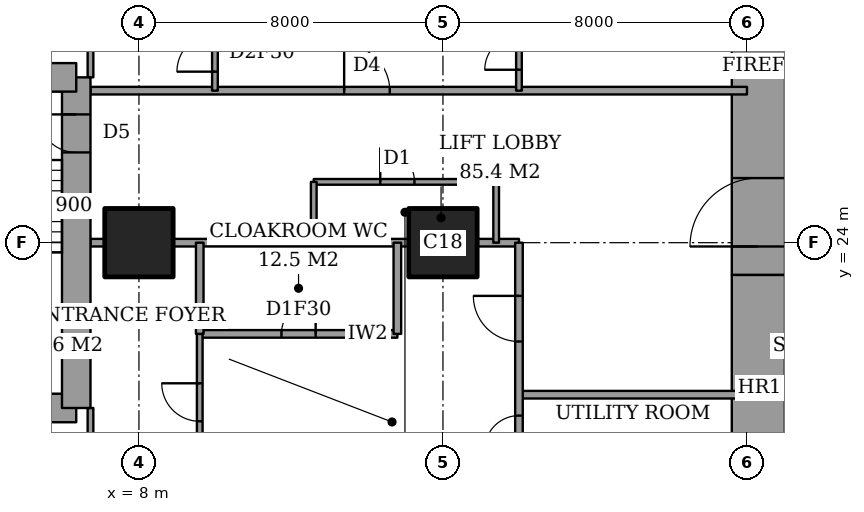
"""IFC4 building model, lengths in metres.
Left out: names, types, materials, properties, quantities, classifications, styles, units other than length and angle.
Written with IfcOpenShell. Run it as: python <this file> out.ifc"""

import sys

from ifc_helpers import new_model, si_unit, direction, frame, frame_2d, origin, origin_2d, place, context, subcontext, project, spatial, rectangle, extrude, element, fill, save


model = new_model("IFC4")
c1 = context("Model", 3, precision=1e-05, world=origin(), true_north=direction((0.0, 1.0)))
c2 = subcontext(c1, "Body", "Model", "MODEL_VIEW")
j1 = project(units=[si_unit("LENGTHUNIT", "METRE"), si_unit("PLANEANGLEUNIT", "RADIAN")], contexts=[c1])
p1 = place(None, origin())
s1 = spatial("IfcSite", under=j1, at=p1, CompositionType="ELEMENT")
p2 = place(p1, origin())
s2 = spatial("IfcBuilding", under=s1, at=p2, CompositionType="ELEMENT")
p3 = place(p2, frame((0.0, 0.0, 189.4)))
s3 = spatial("IfcBuildingStorey", under=s2, at=p3, CompositionType="ELEMENT", Elevation=189.4)
for number, where, z_axis, x_axis in (
    (1, (8.0, 24.0, 0.0), (0.0, 0.0, 1.0), (1.0, 0.0, 0.0)),
    (2, (16.0, 24.0, 0.0), (0.0, 0.0, 1.0), (1.0, 0.0, 0.0)),
):
    element("IfcColumn", number, at=place(p3, frame(where, z_axis=z_axis, x_axis=x_axis)), inside=s3, PredefinedType="COLUMN", context=c2, shape_type="SweptSolid", body=[
        extrude(rectangle(XDim=1.8, YDim=1.8, at=origin_2d()), origin(), (0.0, 0.0, 1.0), 3.6),
    ])
p4 = place(p3, frame((24.3, 13.0, 0.0), z_axis=(0.0, 0.0, 1.0), x_axis=(0.0, 1.0, 0.0)))
e3 = element("IfcWall", 3, at=p4, inside=s3, PredefinedType="SHEAR", context=c2, shape_type="SweptSolid", body=[
    extrude(rectangle(XDim=10.15, YDim=1.4, at=frame_2d((5.075, 0.0))), origin(), (0.0, 0.0, 1.0), 3.6),
])
p5 = place(p3, frame((24.3, 23.15, 0.0), z_axis=(0.0, 0.0, 1.0), x_axis=(0.0, 1.0, 0.0)))
e4 = element("IfcWall", 4, at=p5, inside=s3, PredefinedType="SHEAR", context=c2, shape_type="SweptSolid", body=[
    extrude(rectangle(XDim=11.85, YDim=1.4, at=frame_2d((5.925, 0.0))), origin(), (0.0, 0.0, 1.0), 3.6),
])
p6 = place(p5, frame((0.75, 0.0, 0.0)))
e5 = element("IfcOpeningElement", 5, at=p6, cuts=e4, PredefinedType="OPENING", context=c2, shape_type="SweptSolid", body=[
    extrude(rectangle(XDim=1.8, YDim=2.4, at=frame_2d((0.9, 1.2))), frame((0.0, 0.71, 0.0), z_axis=(0.0, -1.0, 0.0), x_axis=(1.0, 0.0, 0.0)), (0.0, 0.0, 1.0), 1.42),
])
p7 = place(p3, frame((1.9, 19.65, 0.0), z_axis=(0.0, 0.0, 1.0), x_axis=(1.0, 0.0, 0.0)))
e6 = element("IfcWall", 6, at=p7, inside=s3, PredefinedType="SHEAR", context=c2, shape_type="SweptSolid", body=[
    extrude(rectangle(XDim=4.45, YDim=0.75, at=frame_2d((2.225, 0.0))), origin(), (0.0, 0.0, 1.0), 3.6),
])
p8 = place(p3, frame((6.35, 19.65, 0.0), z_axis=(0.0, 0.0, 1.0), x_axis=(0.0, 1.0, 0.0)))
e7 = element("IfcWall", 7, at=p8, inside=s3, PredefinedType="SHEAR", context=c2, shape_type="SweptSolid", body=[
    extrude(rectangle(XDim=8.7, YDim=0.75, at=frame_2d((4.35, 0.0))), origin(), (0.0, 0.0, 1.0), 3.6),
])
p9 = place(p8, frame((6.725, 0.0, 0.0)))
e8 = element("IfcOpeningElement", 8, at=p9, cuts=e7, PredefinedType="OPENING", context=c2, shape_type="SweptSolid", body=[
    extrude(rectangle(XDim=1.0, YDim=2.1, at=frame_2d((0.5, 1.05))), frame((0.0, 0.385, 0.0), z_axis=(0.0, -1.0, 0.0), x_axis=(1.0, 0.0, 0.0)), (0.0, 0.0, 1.0), 0.77),
])
p10 = place(p3, frame((6.35, 28.35, 0.0), z_axis=(0.0, 0.0, 1.0), x_axis=(-1.0, 0.0, 0.0)))
e9 = element("IfcWall", 9, at=p10, inside=s3, PredefinedType="SHEAR", context=c2, shape_type="SweptSolid", body=[
    extrude(rectangle(XDim=4.45, YDim=0.75, at=frame_2d((2.225, 0.0))), origin(), (0.0, 0.0, 1.0), 3.6),
])
p11 = place(p3, frame((18.0, 20.0, 0.0), z_axis=(0.0, 0.0, 1.0), x_axis=(1.0, 0.0, 0.0)))
e10 = element("IfcWall", 10, at=p11, inside=s3, PredefinedType="PARTITIONING", context=c2, shape_type="SweptSolid", body=[
    extrude(rectangle(XDim=6.0, YDim=0.2, at=frame_2d((3.0, 0.0))), origin(), (0.0, 0.0, 1.0), 3.35),
])
p12 = place(p3, frame((9.6, 21.6, 0.0), z_axis=(0.0, 0.0, 1.0), x_axis=(1.0, 0.0, 0.0)))
e11 = element("IfcWall", 11, at=p12, inside=s3, PredefinedType="PARTITIONING", context=c2, shape_type="SweptSolid", body=[
    extrude(rectangle(XDim=5.2, YDim=0.2, at=frame_2d((2.6, 0.0))), origin(), (0.0, 0.0, 1.0), 3.35),
])
p13 = place(p12, frame((2.15, 0.0, 0.0)))
e12 = element("IfcOpeningElement", 12, at=p13, cuts=e11, PredefinedType="OPENING", context=c2, shape_type="SweptSolid", body=[
    extrude(rectangle(XDim=0.9, YDim=2.1, at=frame_2d((0.45, 1.05))), frame((0.0, 0.11, 0.0), z_axis=(0.0, -1.0, 0.0), x_axis=(1.0, 0.0, 0.0)), (0.0, 0.0, 1.0), 0.22),
])
p14 = place(p3, frame((6.725, 24.0, 0.0), z_axis=(0.0, 0.0, 1.0), x_axis=(1.0, 0.0, 0.0)))
e13 = element("IfcWall", 13, at=p14, inside=s3, PredefinedType="PARTITIONING", context=c2, shape_type="SweptSolid", body=[
    extrude(rectangle(XDim=0.375, YDim=0.2, at=frame_2d((0.188, 0.0))), origin(), (0.0, 0.0, 1.0), 3.35),
])
p15 = place(p3, frame((8.9, 24.0, 0.0), z_axis=(0.0, 0.0, 1.0), x_axis=(1.0, 0.0, 0.0)))
e14 = element("IfcWall", 14, at=p15, inside=s3, PredefinedType="PARTITIONING", context=c2, shape_type="SweptSolid", body=[
    extrude(rectangle(XDim=6.2, YDim=0.2, at=frame_2d((3.1, 0.0))), origin(), (0.0, 0.0, 1.0), 3.35),
])
p16 = place(p3, frame((16.9, 24.0, 0.0), z_axis=(0.0, 0.0, 1.0), x_axis=(1.0, 0.0, 0.0)))
e15 = element("IfcWall", 15, at=p16, inside=s3, PredefinedType="PARTITIONING", context=c2, shape_type="SweptSolid", body=[
    extrude(rectangle(XDim=1.1, YDim=0.2, at=frame_2d((0.55, 0.0))), origin(), (0.0, 0.0, 1.0), 3.35),
])
p17 = place(p3, frame((12.6, 25.6, 0.0), z_axis=(0.0, 0.0, 1.0), x_axis=(1.0, 0.0, 0.0)))
e16 = element("IfcWall", 16, at=p17, inside=s3, PredefinedType="PARTITIONING", context=c2, shape_type="SweptSolid", body=[
    extrude(rectangle(XDim=4.8, YDim=0.15, at=frame_2d((2.4, 0.0))), origin(), (0.0, 0.0, 1.0), 3.35),
])
p18 = place(p17, frame((1.75, 0.0, 0.0)))
e17 = element("IfcOpeningElement", 17, at=p18, cuts=e16, PredefinedType="OPENING", context=c2, shape_type="SweptSolid", body=[
    extrude(rectangle(XDim=0.9, YDim=2.1, at=frame_2d((0.45, 1.05))), frame((0.0, 0.085, 0.0), z_axis=(0.0, -1.0, 0.0), x_axis=(1.0, 0.0, 0.0)), (0.0, 0.0, 1.0), 0.17),
])
p19 = place(p3, frame((6.725, 28.0, 0.0), z_axis=(0.0, 0.0, 1.0), x_axis=(1.0, 0.0, 0.0)))
e18 = element("IfcWall", 18, at=p19, inside=s3, PredefinedType="PARTITIONING", context=c2, shape_type="SweptSolid", body=[
    extrude(rectangle(XDim=17.275, YDim=0.2, at=frame_2d((8.637, 0.0))), origin(), (0.0, 0.0, 1.0), 3.35),
])
p20 = place(p19, frame((6.675, 0.0, 0.0)))
e19 = element("IfcOpeningElement", 19, at=p20, cuts=e18, PredefinedType="OPENING", context=c2, shape_type="SweptSolid", body=[
    extrude(rectangle(XDim=1.2, YDim=2.4, at=frame_2d((0.6, 1.2))), frame((0.0, 0.11, 0.0), z_axis=(0.0, -1.0, 0.0), x_axis=(1.0, 0.0, 0.0)), (0.0, 0.0, 1.0), 0.22),
])
p21 = place(p3, frame((6.725, 17.2, 0.0), z_axis=(0.0, 0.0, 1.0), x_axis=(0.0, 1.0, 0.0)))
e20 = element("IfcWall", 20, at=p21, inside=s3, PredefinedType="PARTITIONING", context=c2, shape_type="SweptSolid", body=[
    extrude(rectangle(XDim=2.45, YDim=0.15, at=frame_2d((1.225, 0.0))), origin(), (0.0, 0.0, 1.0), 3.35),
])
p22 = place(p21, frame((0.587, 0.0, 0.0)))
e21 = element("IfcOpeningElement", 21, at=p22, cuts=e20, PredefinedType="OPENING", context=c2, shape_type="SweptSolid", body=[
    extrude(rectangle(XDim=0.9, YDim=2.1, at=frame_2d((0.45, 1.05))), frame((0.0, 0.085, 0.0), z_axis=(0.0, -1.0, 0.0), x_axis=(1.0, 0.0, 0.0)), (0.0, 0.0, 1.0), 0.17),
])
p23 = place(p3, frame((6.725, 28.35, 0.0), z_axis=(0.0, 0.0, 1.0), x_axis=(0.0, 1.0, 0.0)))
e22 = element("IfcWall", 22, at=p23, inside=s3, PredefinedType="PARTITIONING", context=c2, shape_type="SweptSolid", body=[
    extrude(rectangle(XDim=2.45, YDim=0.15, at=frame_2d((1.225, 0.0))), origin(), (0.0, 0.0, 1.0), 3.35),
])
p24 = place(p23, frame((0.913, 0.0, 0.0)))
e23 = element("IfcOpeningElement", 23, at=p24, cuts=e22, PredefinedType="OPENING", context=c2, shape_type="SweptSolid", body=[
    extrude(rectangle(XDim=1.0, YDim=2.1, at=frame_2d((0.5, 1.05))), frame((0.0, 0.085, 0.0), z_axis=(0.0, -1.0, 0.0), x_axis=(1.0, 0.0, 0.0)), (0.0, 0.0, 1.0), 0.17),
])
p25 = place(p3, frame((9.6, 21.6, 0.0), z_axis=(0.0, 0.0, 1.0), x_axis=(0.0, 1.0, 0.0)))
e24 = element("IfcWall", 24, at=p25, inside=s3, PredefinedType="PARTITIONING", context=c2, shape_type="SweptSolid", body=[
    extrude(rectangle(XDim=2.4, YDim=0.2, at=frame_2d((1.2, 0.0))), origin(), (0.0, 0.0, 1.0), 3.35),
])
p26 = place(p3, frame((9.6, 10.6, 0.0), z_axis=(0.0, 0.0, 1.0), x_axis=(0.0, 1.0, 0.0)))
e25 = element("IfcWall", 25, at=p26, inside=s3, PredefinedType="PARTITIONING", context=c2, shape_type="SweptSolid", body=[
    extrude(rectangle(XDim=11.0, YDim=0.15, at=frame_2d((5.5, 0.0))), origin(), (0.0, 0.0, 1.0), 3.35),
])
p27 = place(p26, frame((8.7, 0.0, 0.0)))
e26 = element("IfcOpeningElement", 26, at=p27, cuts=e25, PredefinedType="OPENING", context=c2, shape_type="SweptSolid", body=[
    extrude(rectangle(XDim=1.0, YDim=2.1, at=frame_2d((0.5, 1.05))), frame((0.0, 0.085, 0.0), z_axis=(0.0, -1.0, 0.0), x_axis=(1.0, 0.0, 0.0)), (0.0, 0.0, 1.0), 0.17),
])
p28 = place(p3, frame((10.0, 28.0, 0.0), z_axis=(0.0, 0.0, 1.0), x_axis=(0.0, 1.0, 0.0)))
e27 = element("IfcWall", 27, at=p28, inside=s3, PredefinedType="PARTITIONING", context=c2, shape_type="SweptSolid", body=[
    extrude(rectangle(XDim=9.4, YDim=0.15, at=frame_2d((4.7, 0.0))), origin(), (0.0, 0.0, 1.0), 3.35),
])
p29 = place(p28, frame((0.5, 0.0, 0.0)))
e28 = element("IfcOpeningElement", 28, at=p29, cuts=e27, PredefinedType="OPENING", context=c2, shape_type="SweptSolid", body=[
    extrude(rectangle(XDim=1.0, YDim=2.1, at=frame_2d((0.5, 1.05))), frame((0.0, 0.085, 0.0), z_axis=(0.0, -1.0, 0.0), x_axis=(1.0, 0.0, 0.0)), (0.0, 0.0, 1.0), 0.17),
])
p30 = place(p3, frame((12.6, 24.0, 0.0), z_axis=(0.0, 0.0, 1.0), x_axis=(0.0, 1.0, 0.0)))
e29 = element("IfcWall", 29, at=p30, inside=s3, PredefinedType="PARTITIONING", context=c2, shape_type="SweptSolid", body=[
    extrude(rectangle(XDim=1.6, YDim=0.15, at=frame_2d((0.8, 0.0))), origin(), (0.0, 0.0, 1.0), 3.35),
])
p31 = place(p3, frame((14.8, 21.6, 0.0), z_axis=(0.0, 0.0, 1.0), x_axis=(0.0, 1.0, 0.0)))
e30 = element("IfcWall", 30, at=p31, inside=s3, PredefinedType="PARTITIONING", context=c2, shape_type="SweptSolid", body=[
    extrude(rectangle(XDim=2.4, YDim=0.2, at=frame_2d((1.2, 0.0))), origin(), (0.0, 0.0, 1.0), 3.35),
])
p32 = place(p3, frame((17.4, 24.0, 0.0), z_axis=(0.0, 0.0, 1.0), x_axis=(0.0, 1.0, 0.0)))
e31 = element("IfcWall", 31, at=p32, inside=s3, PredefinedType="PARTITIONING", context=c2, shape_type="SweptSolid", body=[
    extrude(rectangle(XDim=1.6, YDim=0.15, at=frame_2d((0.8, 0.0))), origin(), (0.0, 0.0, 1.0), 3.35),
])
p33 = place(p3, frame((18.0, 18.0, 0.0), z_axis=(0.0, 0.0, 1.0), x_axis=(0.0, 1.0, 0.0)))
e32 = element("IfcWall", 32, at=p33, inside=s3, PredefinedType="PARTITIONING", context=c2, shape_type="SweptSolid", body=[
    extrude(rectangle(XDim=6.0, YDim=0.2, at=frame_2d((3.0, 0.0))), origin(), (0.0, 0.0, 1.0), 3.35),
])
p34 = place(p33, frame((3.4, 0.0, 0.0)))
e33 = element("IfcOpeningElement", 33, at=p34, cuts=e32, PredefinedType="OPENING", context=c2, shape_type="SweptSolid", body=[
    extrude(rectangle(XDim=1.2, YDim=2.4, at=frame_2d((0.6, 1.2))), frame((0.0, 0.11, 0.0), z_axis=(0.0, -1.0, 0.0), x_axis=(1.0, 0.0, 0.0)), (0.0, 0.0, 1.0), 0.22),
])
p35 = place(p33, frame((0.55, 0.0, 0.0)))
e34 = element("IfcOpeningElement", 34, at=p35, cuts=e32, PredefinedType="OPENING", context=c2, shape_type="SweptSolid", body=[
    extrude(rectangle(XDim=0.9, YDim=2.1, at=frame_2d((0.45, 1.05))), frame((0.0, 0.11, 0.0), z_axis=(0.0, -1.0, 0.0), x_axis=(1.0, 0.0, 0.0)), (0.0, 0.0, 1.0), 0.22),
])
p36 = place(p3, frame((18.0, 28.0, 0.0), z_axis=(0.0, 0.0, 1.0), x_axis=(0.0, 1.0, 0.0)))
e35 = element("IfcWall", 35, at=p36, inside=s3, PredefinedType="PARTITIONING", context=c2, shape_type="SweptSolid", body=[
    extrude(rectangle(XDim=9.4, YDim=0.15, at=frame_2d((4.7, 0.0))), origin(), (0.0, 0.0, 1.0), 3.35),
])
p37 = place(p36, frame((0.55, 0.0, 0.0)))
e36 = element("IfcOpeningElement", 36, at=p37, cuts=e35, PredefinedType="OPENING", context=c2, shape_type="SweptSolid", body=[
    extrude(rectangle(XDim=0.9, YDim=2.1, at=frame_2d((0.45, 1.05))), frame((0.0, 0.085, 0.0), z_axis=(0.0, -1.0, 0.0), x_axis=(1.0, 0.0, 0.0)), (0.0, 0.0, 1.0), 0.17),
])
p38 = place(p27, origin())
e37 = element("IfcDoor", 37, at=p38, inside=s3, OperationType="SINGLE_SWING_LEFT", PredefinedType="DOOR", context=c2, shape_type="SweptSolid", body=[
    extrude(rectangle(XDim=1.0, YDim=2.1, at=frame_2d((0.5, 1.05))), frame((0.0, 0.025, 0.0), z_axis=(0.0, -1.0, 0.0), x_axis=(1.0, 0.0, 0.0)), (0.0, 0.0, 1.0), 0.05),
])
fill(e26, e37)
p39 = place(p13, origin())
e38 = element("IfcDoor", 38, at=p39, inside=s3, OperationType="SINGLE_SWING_LEFT", PredefinedType="DOOR", context=c2, shape_type="SweptSolid", body=[
    extrude(rectangle(XDim=0.9, YDim=2.1, at=frame_2d((0.45, 1.05))), frame((0.0, 0.025, 0.0), z_axis=(0.0, -1.0, 0.0), x_axis=(1.0, 0.0, 0.0)), (0.0, 0.0, 1.0), 0.05),
])
fill(e12, e38)
p40 = place(p34, origin())
e39 = element("IfcDoor", 39, at=p40, inside=s3, OperationType="SINGLE_SWING_LEFT", PredefinedType="DOOR", context=c2, shape_type="SweptSolid", body=[
    extrude(rectangle(XDim=1.2, YDim=2.4, at=frame_2d((0.6, 1.2))), frame((0.0, 0.025, 0.0), z_axis=(0.0, -1.0, 0.0), x_axis=(1.0, 0.0, 0.0)), (0.0, 0.0, 1.0), 0.05),
])
fill(e33, e39)
p41 = place(p35, origin())
e40 = element("IfcDoor", 40, at=p41, inside=s3, OperationType="SINGLE_SWING_RIGHT", PredefinedType="DOOR", context=c2, shape_type="SweptSolid", body=[
    extrude(rectangle(XDim=0.9, YDim=2.1, at=frame_2d((0.45, 1.05))), frame((0.0, 0.025, 0.0), z_axis=(0.0, -1.0, 0.0), x_axis=(1.0, 0.0, 0.0)), (0.0, 0.0, 1.0), 0.05),
])
fill(e34, e40)
p42 = place(p29, origin())
e41 = element("IfcDoor", 41, at=p42, inside=s3, OperationType="SINGLE_SWING_RIGHT", PredefinedType="DOOR", context=c2, shape_type="SweptSolid", body=[
    extrude(rectangle(XDim=1.0, YDim=2.1, at=frame_2d((0.5, 1.05))), frame((0.0, 0.025, 0.0), z_axis=(0.0, -1.0, 0.0), x_axis=(1.0, 0.0, 0.0)), (0.0, 0.0, 1.0), 0.05),
])
fill(e28, e41)
p43 = place(p20, origin())
e42 = element("IfcDoor", 42, at=p43, inside=s3, OperationType="SINGLE_SWING_RIGHT", PredefinedType="DOOR", context=c2, shape_type="SweptSolid", body=[
    extrude(rectangle(XDim=1.2, YDim=2.4, at=frame_2d((0.6, 1.2))), frame((0.0, 0.025, 0.0), z_axis=(0.0, -1.0, 0.0), x_axis=(1.0, 0.0, 0.0)), (0.0, 0.0, 1.0), 0.05),
])
fill(e19, e42)
p44 = place(p37, origin())
e43 = element("IfcDoor", 43, at=p44, inside=s3, OperationType="SINGLE_SWING_RIGHT", PredefinedType="DOOR", context=c2, shape_type="SweptSolid", body=[
    extrude(rectangle(XDim=0.9, YDim=2.1, at=frame_2d((0.45, 1.05))), frame((0.0, 0.025, 0.0), z_axis=(0.0, -1.0, 0.0), x_axis=(1.0, 0.0, 0.0)), (0.0, 0.0, 1.0), 0.05),
])
fill(e36, e43)
p45 = place(p18, origin())
e44 = element("IfcDoor", 44, at=p45, inside=s3, OperationType="SINGLE_SWING_RIGHT", PredefinedType="DOOR", context=c2, shape_type="SweptSolid", body=[
    extrude(rectangle(XDim=0.9, YDim=2.1, at=frame_2d((0.45, 1.05))), frame((0.0, 0.025, 0.0), z_axis=(0.0, -1.0, 0.0), x_axis=(1.0, 0.0, 0.0)), (0.0, 0.0, 1.0), 0.05),
])
fill(e17, e44)
p46 = place(p6, origin())
e45 = element("IfcDoor", 45, at=p46, inside=s3, OperationType="DOUBLE_DOOR_DOUBLE_SWING", PredefinedType="DOOR", context=c2, shape_type="SweptSolid", body=[
    extrude(rectangle(XDim=1.8, YDim=2.4, at=frame_2d((0.9, 1.2))), frame((0.0, 0.025, 0.0), z_axis=(0.0, -1.0, 0.0), x_axis=(1.0, 0.0, 0.0)), (0.0, 0.0, 1.0), 0.05),
])
fill(e5, e45)
p47 = place(p9, origin())
e46 = element("IfcDoor", 46, at=p47, inside=s3, OperationType="SINGLE_SWING_LEFT", PredefinedType="DOOR", context=c2, shape_type="SweptSolid", body=[
    extrude(rectangle(XDim=1.0, YDim=2.1, at=frame_2d((0.5, 1.05))), frame((0.0, 0.025, 0.0), z_axis=(0.0, -1.0, 0.0), x_axis=(1.0, 0.0, 0.0)), (0.0, 0.0, 1.0), 0.05),
])
fill(e8, e46)
save(model, sys.argv[1])
